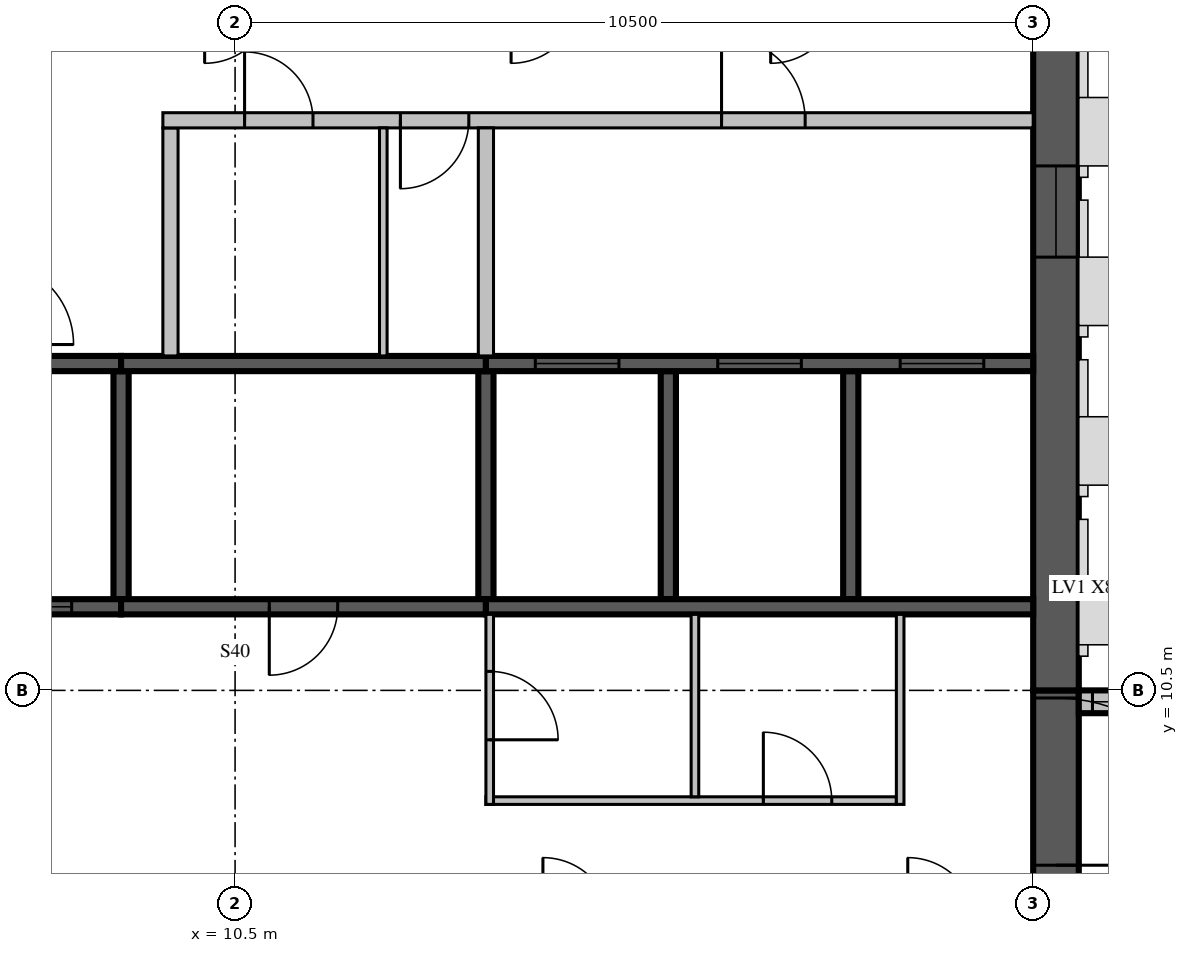
"""IFC4 building model, lengths in metres.
Left out: names, types, materials, properties, quantities, classifications, styles, units other than length and angle.
Written with IfcOpenShell. Run it as: python <this file> out.ifc"""

import sys

from ifc_helpers import new_model, si_unit, direction, frame, frame_2d, origin, place, context, subcontext, project, spatial, rectangle, extrude, source, transform, mapped, element, fill, save


model = new_model("IFC4")
c1 = context("Model", 3, precision=1e-05, world=origin(), true_north=direction((0.0, 1.0)))
c2 = subcontext(c1, "Body", "Model", "MODEL_VIEW")
j1 = project(units=[si_unit("LENGTHUNIT", "METRE"), si_unit("PLANEANGLEUNIT", "RADIAN")], contexts=[c1])
p1 = place(None, origin())
s1 = spatial("IfcSite", under=j1, at=p1, CompositionType="ELEMENT")
p2 = place(p1, origin())
s2 = spatial("IfcBuilding", under=s1, at=p2, CompositionType="ELEMENT")
p3 = place(p2, frame((0.0, 0.0, 323.0)))
s3 = spatial("IfcBuildingStorey", under=s2, at=p3, CompositionType="ELEMENT", Elevation=323.0)
m1 = source(origin(), c2, "Body", "SweptSolid", [
    extrude(rectangle(XDim=6.3, YDim=0.6, at=frame_2d((3.15, 0.0))), origin(), (0.0, 0.0, 1.0), 3.5),
])
p4 = place(p3, frame((21.3, 4.2, 0.0), z_axis=(0.0, 0.0, 1.0), x_axis=(0.0, 1.0, 0.0)))
e1 = element("IfcWall", 1, at=p4, inside=s3, PredefinedType="SHEAR", context=c2, shape_type="MappedRepresentation", body=[
    mapped(m1, transform((0.0, 0.0, 0.0), scale=1.0)),
])
m2 = source(origin(), c2, "Body", "SweptSolid", [
    extrude(rectangle(XDim=2.2, YDim=2.1, at=frame_2d((1.1, 1.05))), frame((0.0, 0.31, 0.0), z_axis=(0.0, -1.0, 0.0), x_axis=(1.0, 0.0, 0.0)), (0.0, 0.0, 1.0), 0.62),
])
p5 = place(p4, frame((4.0, 0.0, 0.0)))
e2 = element("IfcOpeningElement", 2, at=p5, cuts=e1, PredefinedType="OPENING", context=c2, shape_type="MappedRepresentation", body=[
    mapped(m2, transform((0.0, 0.0, 0.0), scale=1.0)),
])
m3 = source(origin(), c2, "Body", "SweptSolid", [
    extrude(rectangle(XDim=10.5, YDim=0.6, at=frame_2d((5.25, 0.0))), origin(), (0.0, 0.0, 1.0), 3.5),
])
p6 = place(p3, frame((21.3, 10.5, 0.0), z_axis=(0.0, 0.0, 1.0), x_axis=(0.0, 1.0, 0.0)))
e3 = element("IfcWall", 3, at=p6, inside=s3, PredefinedType="SHEAR", context=c2, shape_type="MappedRepresentation", body=[
    mapped(m3, transform((0.0, 0.0, 0.0), scale=1.0)),
])
m4 = source(origin(), c2, "Body", "SweptSolid", [
    extrude(rectangle(XDim=1.2, YDim=2.4, at=frame_2d((0.6, 1.2))), frame((0.0, 0.31, 0.0), z_axis=(0.0, -1.0, 0.0), x_axis=(1.0, 0.0, 0.0)), (0.0, 0.0, 1.0), 0.62),
])
p7 = place(p6, frame((5.7, 0.0, 0.6)))
e4 = element("IfcOpeningElement", 4, at=p7, cuts=e3, PredefinedType="OPENING", context=c2, shape_type="MappedRepresentation", body=[
    mapped(m4, transform((0.0, 0.0, 0.0), scale=1.0)),
])
m5 = source(origin(), c2, "Body", "SweptSolid", [
    extrude(rectangle(XDim=7.45, YDim=0.3, at=frame_2d((3.725, 0.0))), origin(), (0.0, 0.0, 1.0), 3.1),
])
p8 = place(p3, frame((29.05, 10.35, 0.0), z_axis=(0.0, 0.0, 1.0), x_axis=(-1.0, 0.0, 0.0)))
e5 = element("IfcWall", 5, at=p8, inside=s3, PredefinedType="STANDARD", context=c2, shape_type="MappedRepresentation", body=[
    mapped(m5, transform((0.0, 0.0, 0.0), scale=1.0)),
])
m6 = source(origin(), c2, "Body", "SweptSolid", [
    extrude(rectangle(XDim=3.0, YDim=2.0, at=frame_2d((1.5, 1.0))), frame((0.0, 0.16, 0.0), z_axis=(0.0, -1.0, 0.0), x_axis=(1.0, 0.0, 0.0)), (0.0, 0.0, 1.0), 0.32),
])
p9 = place(p8, frame((1.09, 0.0, 0.6)))
e6 = element("IfcOpeningElement", 6, at=p9, cuts=e5, PredefinedType="OPENING", context=c2, shape_type="MappedRepresentation", body=[
    mapped(m6, transform((0.0, 0.0, 0.0), scale=1.0)),
])
m7 = source(origin(), c2, "Body", "SweptSolid", [
    extrude(rectangle(XDim=1.8, YDim=2.0, at=frame_2d((0.9, 1.0))), frame((0.0, 0.16, 0.0), z_axis=(0.0, -1.0, 0.0), x_axis=(1.0, 0.0, 0.0)), (0.0, 0.0, 1.0), 0.32),
])
p10 = place(p8, frame((5.47, 0.0, 0.6)))
e7 = element("IfcOpeningElement", 7, at=p10, cuts=e5, PredefinedType="OPENING", context=c2, shape_type="MappedRepresentation", body=[
    mapped(m7, transform((0.0, 0.0, 0.0), scale=1.0)),
])
m8 = source(origin(), c2, "Body", "SweptSolid", [
    extrude(rectangle(XDim=3.0, YDim=0.2, at=frame_2d((1.5, 0.0))), origin(), (0.0, 0.0, 1.0), 3.1),
])
for number, where, z_axis, x_axis in (
    (8, (9.0, 11.7, 0.0), (0.0, 0.0, 1.0), (0.0, 1.0, 0.0)),
    (9, (13.8, 11.7, 0.0), (0.0, 0.0, 1.0), (0.0, 1.0, 0.0)),
):
    element("IfcWall", number, at=place(p3, frame(where, z_axis=z_axis, x_axis=x_axis)), inside=s3, PredefinedType="SOLIDWALL", context=c2, shape_type="MappedRepresentation", body=[
        mapped(m8, transform((0.0, 0.0, 0.0), scale=1.0)),
    ])
m9 = source(origin(), c2, "Body", "SweptSolid", [
    extrude(rectangle(XDim=3.0, YDim=0.2, at=frame_2d((1.5, 0.0))), origin(), (0.0, 0.0, 1.0), 3.5),
])
for number, where, z_axis, x_axis in (
    (10, (16.2, 11.7, 0.0), (0.0, 0.0, 1.0), (0.0, 1.0, 0.0)),
    (11, (18.6, 11.7, 0.0), (0.0, 0.0, 1.0), (0.0, 1.0, 0.0)),
):
    element("IfcWall", number, at=place(p3, frame(where, z_axis=z_axis, x_axis=x_axis)), inside=s3, PredefinedType="SOLIDWALL", context=c2, shape_type="MappedRepresentation", body=[
        mapped(m9, transform((0.0, 0.0, 0.0), scale=1.0)),
    ])
m10 = source(origin(), c2, "Body", "SweptSolid", [
    extrude(rectangle(XDim=4.8, YDim=0.2, at=frame_2d((2.4, 0.0))), origin(), (0.0, 0.0, 1.0), 3.5),
])
p11 = place(p3, frame((4.2, 11.6, 0.0), z_axis=(0.0, 0.0, 1.0), x_axis=(1.0, 0.0, 0.0)))
e12 = element("IfcWall", 12, at=p11, inside=s3, PredefinedType="SOLIDWALL", context=c2, shape_type="MappedRepresentation", body=[
    mapped(m10, transform((0.0, 0.0, 0.0), scale=1.0)),
])
m11 = source(origin(), c2, "Body", "SweptSolid", [
    extrude(rectangle(XDim=1.1, YDim=2.1, at=frame_2d((0.55, 1.05))), frame((0.0, 0.11, 0.0), z_axis=(0.0, -1.0, 0.0), x_axis=(1.0, 0.0, 0.0)), (0.0, 0.0, 1.0), 0.22),
])
p12 = place(p11, frame((0.65, 0.0, 0.0)))
e13 = element("IfcOpeningElement", 13, at=p12, cuts=e12, PredefinedType="OPENING", context=c2, shape_type="MappedRepresentation", body=[
    mapped(m11, transform((0.0, 0.0, 0.0), scale=1.0)),
])
p13 = place(p11, frame((3.05, 0.0, 0.0)))
e14 = element("IfcOpeningElement", 14, at=p13, cuts=e12, PredefinedType="OPENING", context=c2, shape_type="MappedRepresentation", body=[
    mapped(m11, transform((0.0, 0.0, 0.0), scale=1.0)),
])
m12 = source(origin(), c2, "Body", "SweptSolid", [
    extrude(rectangle(XDim=4.8, YDim=0.2, at=frame_2d((2.4, 0.0))), origin(), (0.0, 0.0, 1.0), 3.1),
])
p14 = place(p3, frame((9.0, 11.6, 0.0), z_axis=(0.0, 0.0, 1.0), x_axis=(1.0, 0.0, 0.0)))
e15 = element("IfcWall", 15, at=p14, inside=s3, PredefinedType="SOLIDWALL", context=c2, shape_type="MappedRepresentation", body=[
    mapped(m12, transform((0.0, 0.0, 0.0), scale=1.0)),
])
m13 = source(origin(), c2, "Body", "SweptSolid", [
    extrude(rectangle(XDim=0.9, YDim=2.1, at=frame_2d((0.45, 1.05))), frame((0.0, 0.11, 0.0), z_axis=(0.0, -1.0, 0.0), x_axis=(1.0, 0.0, 0.0)), (0.0, 0.0, 1.0), 0.22),
])
p15 = place(p14, frame((1.95, 0.0, 0.0)))
e16 = element("IfcOpeningElement", 16, at=p15, cuts=e15, PredefinedType="OPENING", context=c2, shape_type="MappedRepresentation", body=[
    mapped(m13, transform((0.0, 0.0, 0.0), scale=1.0)),
])
m14 = source(origin(), c2, "Body", "SweptSolid", [
    extrude(rectangle(XDim=7.2, YDim=0.2, at=frame_2d((3.6, 0.0))), origin(), (0.0, 0.0, 1.0), 3.5),
])
p16 = place(p3, frame((13.8, 11.6, 0.0), z_axis=(0.0, 0.0, 1.0), x_axis=(1.0, 0.0, 0.0)))
e17 = element("IfcWall", 17, at=p16, inside=s3, PredefinedType="SOLIDWALL", context=c2, shape_type="MappedRepresentation", body=[
    mapped(m14, transform((0.0, 0.0, 0.0), scale=1.0)),
])
p17 = place(p3, frame((4.2, 14.8, 0.0), z_axis=(0.0, 0.0, 1.0), x_axis=(1.0, 0.0, 0.0)))
e18 = element("IfcWall", 18, at=p17, inside=s3, PredefinedType="SOLIDWALL", context=c2, shape_type="MappedRepresentation", body=[
    mapped(m10, transform((0.0, 0.0, 0.0), scale=1.0)),
])
p18 = place(p3, frame((9.0, 14.8, 0.0), z_axis=(0.0, 0.0, 1.0), x_axis=(1.0, 0.0, 0.0)))
e19 = element("IfcWall", 19, at=p18, inside=s3, PredefinedType="SOLIDWALL", context=c2, shape_type="MappedRepresentation", body=[
    mapped(m12, transform((0.0, 0.0, 0.0), scale=1.0)),
])
p19 = place(p3, frame((13.8, 14.8, 0.0), z_axis=(0.0, 0.0, 1.0), x_axis=(1.0, 0.0, 0.0)))
e20 = element("IfcWall", 20, at=p19, inside=s3, PredefinedType="SOLIDWALL", context=c2, shape_type="MappedRepresentation", body=[
    mapped(m14, transform((0.0, 0.0, 0.0), scale=1.0)),
])
p20 = place(p19, frame((0.65, 0.0, 0.0)))
e21 = element("IfcOpeningElement", 21, at=p20, cuts=e20, PredefinedType="OPENING", context=c2, shape_type="MappedRepresentation", body=[
    mapped(m11, transform((0.0, 0.0, 0.0), scale=1.0)),
])
p21 = place(p19, frame((3.05, 0.0, 0.0)))
e22 = element("IfcOpeningElement", 22, at=p21, cuts=e20, PredefinedType="OPENING", context=c2, shape_type="MappedRepresentation", body=[
    mapped(m11, transform((0.0, 0.0, 0.0), scale=1.0)),
])
p22 = place(p19, frame((5.45, 0.0, 0.0)))
e23 = element("IfcOpeningElement", 23, at=p22, cuts=e20, PredefinedType="OPENING", context=c2, shape_type="MappedRepresentation", body=[
    mapped(m11, transform((0.0, 0.0, 0.0), scale=1.0)),
])
m15 = source(origin(), c2, "Body", "SweptSolid", [
    extrude(rectangle(XDim=3.0, YDim=0.2, at=frame_2d((1.5, 0.0))), origin(), (0.0, 0.0, 1.0), 3.1),
])
p23 = place(p3, frame((9.65, 14.9, 0.0), z_axis=(0.0, 0.0, 1.0), x_axis=(0.0, 1.0, 0.0)))
e24 = element("IfcWall", 24, at=p23, inside=s3, PredefinedType="PARTITIONING", context=c2, shape_type="MappedRepresentation", body=[
    mapped(m15, transform((0.0, 0.0, 0.0), scale=1.0)),
])
m16 = source(origin(), c2, "Body", "SweptSolid", [
    extrude(rectangle(XDim=11.45, YDim=0.2, at=frame_2d((5.725, 0.0))), origin(), (0.0, 0.0, 1.0), 3.1),
])
p24 = place(p3, frame((9.55, 18.0, 0.0), z_axis=(0.0, 0.0, 1.0), x_axis=(1.0, 0.0, 0.0)))
e25 = element("IfcWall", 25, at=p24, inside=s3, PredefinedType="PARTITIONING", context=c2, shape_type="MappedRepresentation", body=[
    mapped(m16, transform((0.0, 0.0, 0.0), scale=1.0)),
])
p25 = place(p24, frame((1.075, 0.0, 0.0)))
e26 = element("IfcOpeningElement", 26, at=p25, cuts=e25, PredefinedType="OPENING", context=c2, shape_type="MappedRepresentation", body=[
    mapped(m13, transform((0.0, 0.0, 0.0), scale=1.0)),
])
p26 = place(p24, frame((3.125, 0.0, 0.0)))
e27 = element("IfcOpeningElement", 27, at=p26, cuts=e25, PredefinedType="OPENING", context=c2, shape_type="MappedRepresentation", body=[
    mapped(m13, transform((0.0, 0.0, 0.0), scale=1.0)),
])
p27 = place(p24, frame((7.35, 0.0, 0.0)))
e28 = element("IfcOpeningElement", 28, at=p27, cuts=e25, PredefinedType="OPENING", context=c2, shape_type="MappedRepresentation", body=[
    mapped(m11, transform((0.0, 0.0, 0.0), scale=1.0)),
])
m17 = source(origin(), c2, "Body", "SweptSolid", [
    extrude(rectangle(XDim=5.4, YDim=0.1, at=frame_2d((2.7, 0.0))), origin(), (0.0, 0.0, 1.0), 3.1),
])
p28 = place(p3, frame((13.8, 9.05, 0.0), z_axis=(0.0, 0.0, 1.0), x_axis=(1.0, 0.0, 0.0)))
e29 = element("IfcWall", 29, at=p28, inside=s3, PredefinedType="PARTITIONING", context=c2, shape_type="MappedRepresentation", body=[
    mapped(m17, transform((0.0, 0.0, 0.0), scale=1.0)),
])
m18 = source(origin(), c2, "Body", "SweptSolid", [
    extrude(rectangle(XDim=0.9, YDim=2.1, at=frame_2d((0.45, 1.05))), frame((0.0, 0.06, 0.0), z_axis=(0.0, -1.0, 0.0), x_axis=(1.0, 0.0, 0.0)), (0.0, 0.0, 1.0), 0.12),
])
p29 = place(p28, frame((3.65, 0.0, 0.0)))
e30 = element("IfcOpeningElement", 30, at=p29, cuts=e29, PredefinedType="OPENING", context=c2, shape_type="MappedRepresentation", body=[
    mapped(m18, transform((0.0, 0.0, 0.0), scale=1.0)),
])
m19 = source(origin(), c2, "Body", "SweptSolid", [
    extrude(rectangle(XDim=2.5, YDim=0.1, at=frame_2d((1.25, 0.0))), origin(), (0.0, 0.0, 1.0), 3.1),
])
p30 = place(p3, frame((13.85, 9.0, 0.0), z_axis=(0.0, 0.0, 1.0), x_axis=(0.0, 1.0, 0.0)))
e31 = element("IfcWall", 31, at=p30, inside=s3, PredefinedType="PARTITIONING", context=c2, shape_type="MappedRepresentation", body=[
    mapped(m19, transform((0.0, 0.0, 0.0), scale=1.0)),
])
p31 = place(p30, frame((0.85, 0.0, 0.0)))
e32 = element("IfcOpeningElement", 32, at=p31, cuts=e31, PredefinedType="OPENING", context=c2, shape_type="MappedRepresentation", body=[
    mapped(m18, transform((0.0, 0.0, 0.0), scale=1.0)),
])
m20 = source(origin(), c2, "Body", "SweptSolid", [
    extrude(rectangle(XDim=2.4, YDim=0.1, at=frame_2d((1.2, 0.0))), origin(), (0.0, 0.0, 1.0), 3.1),
])
p32 = place(p3, frame((16.55, 9.1, 0.0), z_axis=(0.0, 0.0, 1.0), x_axis=(0.0, 1.0, 0.0)))
e33 = element("IfcWall", 33, at=p32, inside=s3, PredefinedType="PARTITIONING", context=c2, shape_type="MappedRepresentation", body=[
    mapped(m20, transform((0.0, 0.0, 0.0), scale=1.0)),
])
p33 = place(p3, frame((19.25, 9.0, 0.0), z_axis=(0.0, 0.0, 1.0), x_axis=(0.0, 1.0, 0.0)))
e34 = element("IfcWall", 34, at=p33, inside=s3, PredefinedType="PARTITIONING", context=c2, shape_type="MappedRepresentation", body=[
    mapped(m19, transform((0.0, 0.0, 0.0), scale=1.0)),
])
p34 = place(p3, frame((13.8, 14.9, 0.0), z_axis=(0.0, 0.0, 1.0), x_axis=(0.0, 1.0, 0.0)))
e35 = element("IfcWall", 35, at=p34, inside=s3, PredefinedType="PARTITIONING", context=c2, shape_type="MappedRepresentation", body=[
    mapped(m15, transform((0.0, 0.0, 0.0), scale=1.0)),
])
m21 = source(origin(), c2, "Body", "SweptSolid", [
    extrude(rectangle(XDim=3.0, YDim=0.1, at=frame_2d((1.5, 0.0))), origin(), (0.0, 0.0, 1.0), 3.1),
])
p35 = place(p3, frame((12.45, 14.9, 0.0), z_axis=(0.0, 0.0, 1.0), x_axis=(0.0, 1.0, 0.0)))
e36 = element("IfcWall", 36, at=p35, inside=s3, PredefinedType="PARTITIONING", context=c2, shape_type="MappedRepresentation", body=[
    mapped(m21, transform((0.0, 0.0, 0.0), scale=1.0)),
])
m22 = source(origin(), c2, "Body", "SweptSolid", [
    extrude(rectangle(XDim=1.8, YDim=2.0, at=frame_2d((0.9, 1.0))), frame((0.0, 0.03, 0.0), z_axis=(0.0, -1.0, 0.0), x_axis=(1.0, 0.0, 0.0)), (0.0, 0.0, 1.0), 0.06),
])
p36 = place(p10, origin())
e37 = element("IfcWindow", 37, at=p36, inside=s3, PartitioningType="SINGLE_PANEL", PredefinedType="WINDOW", context=c2, shape_type="MappedRepresentation", body=[
    mapped(m22, transform((0.0, 0.0, 0.0), scale=1.0)),
])
fill(e7, e37)
m23 = source(origin(), c2, "Body", "SweptSolid", [
    extrude(rectangle(XDim=1.1, YDim=2.1, at=frame_2d((0.55, 1.05))), frame((0.0, 0.025, 0.0), z_axis=(0.0, -1.0, 0.0), x_axis=(1.0, 0.0, 0.0)), (0.0, 0.0, 1.0), 0.05),
])
p37 = place(p13, origin())
e38 = element("IfcDoor", 38, at=p37, inside=s3, OperationType="SLIDING_TO_LEFT", PredefinedType="DOOR", context=c2, shape_type="MappedRepresentation", body=[
    mapped(m23, transform((0.0, 0.0, 0.0), scale=1.0)),
])
fill(e14, e38)
m24 = source(origin(), c2, "Body", "SweptSolid", [
    extrude(rectangle(XDim=0.9, YDim=2.1, at=frame_2d((0.45, 1.05))), frame((0.0, 0.025, 0.0), z_axis=(0.0, -1.0, 0.0), x_axis=(1.0, 0.0, 0.0)), (0.0, 0.0, 1.0), 0.05),
])
p38 = place(p15, origin())
e39 = element("IfcDoor", 39, at=p38, inside=s3, OperationType="SINGLE_SWING_RIGHT", PredefinedType="DOOR", context=c2, shape_type="MappedRepresentation", body=[
    mapped(m24, transform((0.0, 0.0, 0.0), scale=1.0)),
])
fill(e16, e39)
p39 = place(p20, origin())
e40 = element("IfcDoor", 40, at=p39, inside=s3, OperationType="SLIDING_TO_LEFT", PredefinedType="DOOR", context=c2, shape_type="MappedRepresentation", body=[
    mapped(m23, transform((0.0, 0.0, 0.0), scale=1.0)),
])
fill(e21, e40)
p40 = place(p21, origin())
e41 = element("IfcDoor", 41, at=p40, inside=s3, OperationType="SLIDING_TO_LEFT", PredefinedType="DOOR", context=c2, shape_type="MappedRepresentation", body=[
    mapped(m23, transform((0.0, 0.0, 0.0), scale=1.0)),
])
fill(e22, e41)
p41 = place(p22, origin())
e42 = element("IfcDoor", 42, at=p41, inside=s3, OperationType="SLIDING_TO_LEFT", PredefinedType="DOOR", context=c2, shape_type="MappedRepresentation", body=[
    mapped(m23, transform((0.0, 0.0, 0.0), scale=1.0)),
])
fill(e23, e42)
p42 = place(p25, origin())
e43 = element("IfcDoor", 43, at=p42, inside=s3, OperationType="SINGLE_SWING_LEFT", PredefinedType="DOOR", context=c2, shape_type="MappedRepresentation", body=[
    mapped(m24, transform((0.0, 0.0, 0.0), scale=1.0)),
])
fill(e26, e43)
p43 = place(p26, origin())
e44 = element("IfcDoor", 44, at=p43, inside=s3, OperationType="SINGLE_SWING_RIGHT", PredefinedType="DOOR", context=c2, shape_type="MappedRepresentation", body=[
    mapped(m24, transform((0.0, 0.0, 0.0), scale=1.0)),
])
fill(e27, e44)
p44 = place(p27, origin())
e45 = element("IfcDoor", 45, at=p44, inside=s3, OperationType="SINGLE_SWING_LEFT", PredefinedType="DOOR", context=c2, shape_type="MappedRepresentation", body=[
    mapped(m23, transform((0.0, 0.0, 0.0), scale=1.0)),
])
fill(e28, e45)
p45 = place(p29, origin())
e46 = element("IfcDoor", 46, at=p45, inside=s3, OperationType="SINGLE_SWING_LEFT", PredefinedType="DOOR", context=c2, shape_type="MappedRepresentation", body=[
    mapped(m24, transform((0.0, 0.0, 0.0), scale=1.0)),
])
fill(e30, e46)
p46 = place(p31, origin())
e47 = element("IfcDoor", 47, at=p46, inside=s3, OperationType="SINGLE_SWING_RIGHT", PredefinedType="DOOR", context=c2, shape_type="MappedRepresentation", body=[
    mapped(m24, transform((0.0, 0.0, 0.0), scale=1.0)),
])
fill(e32, e47)
m25 = source(origin(), c2, "Body", "SweptSolid", [
    extrude(rectangle(XDim=2.2, YDim=2.1, at=frame_2d((1.1, 1.05))), frame((0.0, 0.025, 0.0), z_axis=(0.0, -1.0, 0.0), x_axis=(1.0, 0.0, 0.0)), (0.0, 0.0, 1.0), 0.05),
])
p47 = place(p5, origin())
e48 = element("IfcDoor", 48, at=p47, inside=s3, OperationType="DOUBLE_DOOR_SINGLE_SWING", PredefinedType="DOOR", context=c2, shape_type="MappedRepresentation", body=[
    mapped(m25, transform((0.0, 0.0, 0.0), scale=1.0)),
])
fill(e2, e48)
m26 = source(origin(), c2, "Body", "SweptSolid", [
    extrude(rectangle(XDim=1.2, YDim=2.4, at=frame_2d((0.6, 1.2))), frame((0.0, 0.03, 0.0), z_axis=(0.0, -1.0, 0.0), x_axis=(1.0, 0.0, 0.0)), (0.0, 0.0, 1.0), 0.06),
])
p48 = place(p7, origin())
e49 = element("IfcWindow", 49, at=p48, inside=s3, PartitioningType="SINGLE_PANEL", PredefinedType="WINDOW", context=c2, shape_type="MappedRepresentation", body=[
    mapped(m26, transform((0.0, 0.0, 0.0), scale=1.0)),
])
fill(e4, e49)
save(model, sys.argv[1])
